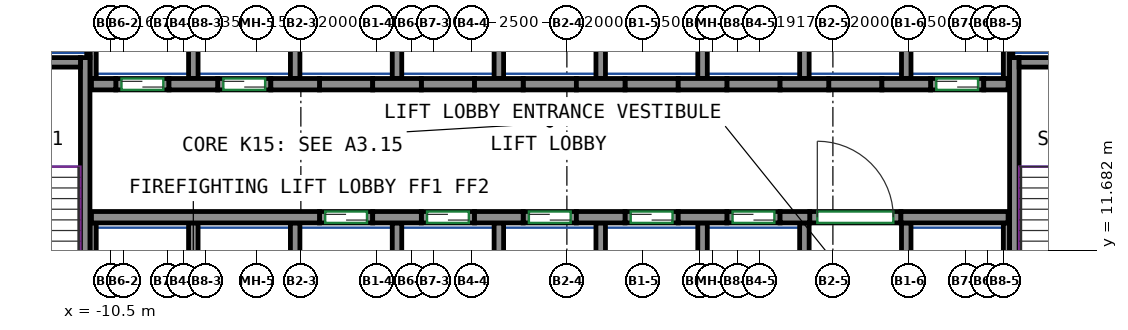
"""IFC4 building model, lengths in metres.
Left out: names, types, materials, properties, quantities, classifications, styles, units other than length and angle.
Written with IfcOpenShell. Run it as: python <this file> out.ifc"""

import sys

from ifc_helpers import new_model, si_unit, direction, frame, frame_2d, origin, place, context, subcontext, project, spatial, rectangle, extrude, source, transform, mapped, element, fill, save


model = new_model("IFC4")
c1 = context("Model", 3, precision=1e-05, world=origin(), true_north=direction((0.0, 1.0)))
c2 = subcontext(c1, "Body", "Model", "MODEL_VIEW")
j1 = project(units=[si_unit("LENGTHUNIT", "METRE"), si_unit("PLANEANGLEUNIT", "RADIAN")], contexts=[c1])
p1 = place(None, origin())
s1 = spatial("IfcSite", under=j1, at=p1, CompositionType="ELEMENT")
p2 = place(p1, origin())
s2 = spatial("IfcBuilding", under=s1, at=p2, CompositionType="ELEMENT")
p3 = place(p2, frame((0.0, 0.0, 63.2)))
s3 = spatial("IfcBuildingStorey", under=s2, at=p3, CompositionType="ELEMENT", Elevation=63.2)
m1 = source(origin(), c2, "Body", "SweptSolid", [
    extrude(rectangle(XDim=7.75, YDim=0.25, at=frame_2d((3.875, 0.0))), origin(), (0.0, 0.0, 1.0), 3.72),
])
p4 = place(p3, frame((-11.175, 9.0, 0.0), z_axis=(0.0, 0.0, 1.0), x_axis=(0.0, 1.0, 0.0)))
e1 = element("IfcWall", 1, at=p4, inside=s3, PredefinedType="SHEAR", context=c2, shape_type="MappedRepresentation", body=[
    mapped(m1, transform((0.0, 0.0, 0.0))),
])
m2 = source(origin(), c2, "Body", "SweptSolid", [
    extrude(rectangle(XDim=3.7, YDim=0.25, at=frame_2d((1.85, 0.0))), origin(), (0.0, 0.0, 1.0), 3.72),
])
p5 = place(p3, frame((-15.0, 16.625, 0.0), z_axis=(0.0, 0.0, 1.0), x_axis=(1.0, 0.0, 0.0)))
e2 = element("IfcWall", 2, at=p5, inside=s3, PredefinedType="SHEAR", context=c2, shape_type="MappedRepresentation", body=[
    mapped(m2, transform((0.0, 0.0, 0.0))),
])
p6 = place(p3, frame((13.275, 9.0, 0.0), z_axis=(0.0, 0.0, 1.0), x_axis=(0.0, 1.0, 0.0)))
e3 = element("IfcWall", 3, at=p6, inside=s3, PredefinedType="SHEAR", context=c2, shape_type="MappedRepresentation", body=[
    mapped(m1, transform((0.0, 0.0, 0.0))),
])
m3 = source(origin(), c2, "Body", "SweptSolid", [
    extrude(rectangle(XDim=3.7, YDim=0.25, at=frame_2d((1.85, 0.0))), origin(), (0.0, 0.0, 1.0), 3.72),
])
p7 = place(p3, frame((13.4, 16.625, 0.0), z_axis=(0.0, 0.0, 1.0), x_axis=(1.0, 0.0, 0.0)))
e4 = element("IfcWall", 4, at=p7, inside=s3, PredefinedType="SHEAR", context=c2, shape_type="MappedRepresentation", body=[
    mapped(m3, transform((0.0, 0.0, 0.0))),
])
m4 = source(origin(), c2, "Body", "SweptSolid", [
    extrude(rectangle(XDim=6.0, YDim=0.3, at=frame_2d((3.0, 0.0))), origin(), (0.0, 0.0, 1.0), 3.72),
])
p8 = place(p3, frame((-11.01, 12.55, 0.0), z_axis=(0.0, 0.0, 1.0), x_axis=(1.0, 0.0, 0.0)))
e5 = element("IfcWall", 5, at=p8, inside=s3, PredefinedType="SHEAR", context=c2, shape_type="MappedRepresentation", body=[
    mapped(m4, transform((0.0, 0.0, 0.0))),
])
m5 = source(origin(), c2, "Body", "SweptSolid", [
    extrude(rectangle(XDim=1.28, YDim=0.3, at=frame_2d((0.64, 0.0))), origin(), (0.0, 0.0, 1.0), 3.72),
])
for number, where, z_axis, x_axis in (
    (6, (-3.61, 12.55, 0.0), (0.0, 0.0, 1.0), (1.0, 0.0, 0.0)),
    (7, (-0.93, 12.55, 0.0), (0.0, 0.0, 1.0), (1.0, 0.0, 0.0)),
    (8, (1.75, 12.55, 0.0), (0.0, 0.0, 1.0), (1.0, 0.0, 0.0)),
    (9, (4.43, 12.55, 0.0), (0.0, 0.0, 1.0), (1.0, 0.0, 0.0)),
):
    element("IfcWall", number, at=place(p3, frame(where, z_axis=z_axis, x_axis=x_axis)), inside=s3, PredefinedType="SHEAR", context=c2, shape_type="MappedRepresentation", body=[
        mapped(m5, transform((0.0, 0.0, 0.0))),
    ])
m6 = source(origin(), c2, "Body", "SweptSolid", [
    extrude(rectangle(XDim=0.78, YDim=0.3, at=frame_2d((0.39, 0.0))), origin(), (0.0, 0.0, 1.0), 3.72),
])
p9 = place(p3, frame((7.11, 12.55, 0.0), z_axis=(0.0, 0.0, 1.0), x_axis=(1.0, 0.0, 0.0)))
e10 = element("IfcWall", 10, at=p9, inside=s3, PredefinedType="SHEAR", context=c2, shape_type="MappedRepresentation", body=[
    mapped(m6, transform((0.0, 0.0, 0.0))),
])
m7 = source(origin(), c2, "Body", "SweptSolid", [
    extrude(rectangle(XDim=2.82, YDim=0.3, at=frame_2d((1.41, 0.0))), origin(), (0.0, 0.0, 1.0), 3.72),
])
p10 = place(p3, frame((10.29, 12.55, 0.0), z_axis=(0.0, 0.0, 1.0), x_axis=(1.0, 0.0, 0.0)))
e11 = element("IfcWall", 11, at=p10, inside=s3, PredefinedType="SHEAR", context=c2, shape_type="MappedRepresentation", body=[
    mapped(m7, transform((0.0, 0.0, 0.0))),
])
m8 = source(origin(), c2, "Body", "SweptSolid", [
    extrude(rectangle(XDim=0.64, YDim=0.3, at=frame_2d((0.32, 0.0))), origin(), (0.0, 0.0, 1.0), 3.72),
])
p11 = place(p3, frame((-11.01, 16.05, 0.0), z_axis=(0.0, 0.0, 1.0), x_axis=(1.0, 0.0, 0.0)))
e12 = element("IfcWall", 12, at=p11, inside=s3, PredefinedType="SHEAR", context=c2, shape_type="MappedRepresentation", body=[
    mapped(m8, transform((0.0, 0.0, 0.0))),
])
for number, where, z_axis, x_axis in (
    (13, (-8.97, 16.05, 0.0), (0.0, 0.0, 1.0), (1.0, 0.0, 0.0)),
    (14, (-6.29, 16.05, 0.0), (0.0, 0.0, 1.0), (1.0, 0.0, 0.0)),
    (15, (-3.61, 16.05, 0.0), (0.0, 0.0, 1.0), (1.0, 0.0, 0.0)),
    (16, (-0.93, 16.05, 0.0), (0.0, 0.0, 1.0), (1.0, 0.0, 0.0)),
    (17, (1.75, 16.05, 0.0), (0.0, 0.0, 1.0), (1.0, 0.0, 0.0)),
    (18, (4.43, 16.05, 0.0), (0.0, 0.0, 1.0), (1.0, 0.0, 0.0)),
):
    element("IfcWall", number, at=place(p3, frame(where, z_axis=z_axis, x_axis=x_axis)), inside=s3, PredefinedType="SHEAR", context=c2, shape_type="MappedRepresentation", body=[
        mapped(m5, transform((0.0, 0.0, 0.0))),
    ])
m9 = source(origin(), c2, "Body", "SweptSolid", [
    extrude(rectangle(XDim=1.28, YDim=0.3, at=frame_2d((0.64, 0.0))), origin(), (0.0, 0.0, 1.0), 3.72),
])
p12 = place(p3, frame((7.11, 16.05, 0.0), z_axis=(0.0, 0.0, 1.0), x_axis=(1.0, 0.0, 0.0)))
e19 = element("IfcWall", 19, at=p12, inside=s3, PredefinedType="SHEAR", context=c2, shape_type="MappedRepresentation", body=[
    mapped(m9, transform((0.0, 0.0, 0.0))),
])
p13 = place(p3, frame((9.79, 16.05, 0.0), z_axis=(0.0, 0.0, 1.0), x_axis=(1.0, 0.0, 0.0)))
e20 = element("IfcWall", 20, at=p13, inside=s3, PredefinedType="SHEAR", context=c2, shape_type="MappedRepresentation", body=[
    mapped(m5, transform((0.0, 0.0, 0.0))),
])
m10 = source(origin(), c2, "Body", "SweptSolid", [
    extrude(rectangle(XDim=0.64, YDim=0.3, at=frame_2d((0.32, 0.0))), origin(), (0.0, 0.0, 1.0), 3.72),
])
p14 = place(p3, frame((12.47, 16.05, 0.0), z_axis=(0.0, 0.0, 1.0), x_axis=(1.0, 0.0, 0.0)))
e21 = element("IfcWall", 21, at=p14, inside=s3, PredefinedType="SHEAR", context=c2, shape_type="MappedRepresentation", body=[
    mapped(m10, transform((0.0, 0.0, 0.0))),
])
m11 = source(origin(), c2, "Body", "SweptSolid", [
    extrude(rectangle(XDim=1.4, YDim=0.3, at=frame_2d((0.7, 0.0))), origin(), (0.0, 0.0, 1.0), 3.72),
])
p15 = place(p3, frame((-5.01, 12.55, 0.0), z_axis=(0.0, 0.0, 1.0), x_axis=(1.0, 0.0, 0.0)))
e22 = element("IfcWall", 22, at=p15, inside=s3, PredefinedType="PARTITIONING", context=c2, shape_type="MappedRepresentation", body=[
    mapped(m11, transform((0.0, 0.0, 0.0))),
])
p16 = place(p15, frame((0.15, 0.0, 0.0)))
e23 = element("IfcOpeningElement", 23, at=p16, cuts=e22, PredefinedType="OPENING", context=c2, shape_type="SweptSolid", body=[
    extrude(rectangle(XDim=1.1, YDim=2.1, at=frame_2d((0.55, 1.05))), frame((0.0, 0.16, 0.0), z_axis=(0.0, -1.0, 0.0), x_axis=(1.0, 0.0, 0.0)), (0.0, 0.0, 1.0), 0.32),
])
m12 = source(origin(), c2, "Body", "SweptSolid", [
    extrude(rectangle(XDim=1.4, YDim=0.3, at=frame_2d((0.7, 0.0))), origin(), (0.0, 0.0, 1.0), 3.72),
])
p17 = place(p3, frame((-2.33, 12.55, 0.0), z_axis=(0.0, 0.0, 1.0), x_axis=(1.0, 0.0, 0.0)))
e24 = element("IfcWall", 24, at=p17, inside=s3, PredefinedType="PARTITIONING", context=c2, shape_type="MappedRepresentation", body=[
    mapped(m12, transform((0.0, 0.0, 0.0))),
])
p18 = place(p17, frame((0.15, 0.0, 0.0)))
e25 = element("IfcOpeningElement", 25, at=p18, cuts=e24, PredefinedType="OPENING", context=c2, shape_type="SweptSolid", body=[
    extrude(rectangle(XDim=1.1, YDim=2.1, at=frame_2d((0.55, 1.05))), frame((0.0, 0.16, 0.0), z_axis=(0.0, -1.0, 0.0), x_axis=(1.0, 0.0, 0.0)), (0.0, 0.0, 1.0), 0.32),
])
p19 = place(p3, frame((0.35, 12.55, 0.0), z_axis=(0.0, 0.0, 1.0), x_axis=(1.0, 0.0, 0.0)))
e26 = element("IfcWall", 26, at=p19, inside=s3, PredefinedType="PARTITIONING", context=c2, shape_type="MappedRepresentation", body=[
    mapped(m11, transform((0.0, 0.0, 0.0))),
])
p20 = place(p19, frame((0.15, 0.0, 0.0)))
e27 = element("IfcOpeningElement", 27, at=p20, cuts=e26, PredefinedType="OPENING", context=c2, shape_type="SweptSolid", body=[
    extrude(rectangle(XDim=1.1, YDim=2.1, at=frame_2d((0.55, 1.05))), frame((0.0, 0.16, 0.0), z_axis=(0.0, -1.0, 0.0), x_axis=(1.0, 0.0, 0.0)), (0.0, 0.0, 1.0), 0.32),
])
p21 = place(p3, frame((3.03, 12.55, 0.0), z_axis=(0.0, 0.0, 1.0), x_axis=(1.0, 0.0, 0.0)))
e28 = element("IfcWall", 28, at=p21, inside=s3, PredefinedType="PARTITIONING", context=c2, shape_type="MappedRepresentation", body=[
    mapped(m11, transform((0.0, 0.0, 0.0))),
])
p22 = place(p21, frame((0.15, 0.0, 0.0)))
e29 = element("IfcOpeningElement", 29, at=p22, cuts=e28, PredefinedType="OPENING", context=c2, shape_type="SweptSolid", body=[
    extrude(rectangle(XDim=1.1, YDim=2.1, at=frame_2d((0.55, 1.05))), frame((0.0, 0.16, 0.0), z_axis=(0.0, -1.0, 0.0), x_axis=(1.0, 0.0, 0.0)), (0.0, 0.0, 1.0), 0.32),
])
p23 = place(p3, frame((5.71, 12.55, 0.0), z_axis=(0.0, 0.0, 1.0), x_axis=(1.0, 0.0, 0.0)))
e30 = element("IfcWall", 30, at=p23, inside=s3, PredefinedType="PARTITIONING", context=c2, shape_type="MappedRepresentation", body=[
    mapped(m12, transform((0.0, 0.0, 0.0))),
])
p24 = place(p23, frame((0.15, 0.0, 0.0)))
e31 = element("IfcOpeningElement", 31, at=p24, cuts=e30, PredefinedType="OPENING", context=c2, shape_type="SweptSolid", body=[
    extrude(rectangle(XDim=1.1, YDim=2.1, at=frame_2d((0.55, 1.05))), frame((0.0, 0.16, 0.0), z_axis=(0.0, -1.0, 0.0), x_axis=(1.0, 0.0, 0.0)), (0.0, 0.0, 1.0), 0.32),
])
p25 = place(p3, frame((11.07, 16.05, 0.0), z_axis=(0.0, 0.0, 1.0), x_axis=(1.0, 0.0, 0.0)))
e32 = element("IfcWall", 32, at=p25, inside=s3, PredefinedType="PARTITIONING", context=c2, shape_type="MappedRepresentation", body=[
    mapped(m11, transform((0.0, 0.0, 0.0))),
])
p26 = place(p25, frame((0.15, 0.0, 0.0)))
e33 = element("IfcOpeningElement", 33, at=p26, cuts=e32, PredefinedType="OPENING", context=c2, shape_type="SweptSolid", body=[
    extrude(rectangle(XDim=1.1, YDim=2.1, at=frame_2d((0.55, 1.05))), frame((0.0, 0.16, 0.0), z_axis=(0.0, -1.0, 0.0), x_axis=(1.0, 0.0, 0.0)), (0.0, 0.0, 1.0), 0.32),
])
p27 = place(p3, frame((-10.37, 16.05, 0.0), z_axis=(0.0, 0.0, 1.0), x_axis=(1.0, 0.0, 0.0)))
e34 = element("IfcWall", 34, at=p27, inside=s3, PredefinedType="PARTITIONING", context=c2, shape_type="MappedRepresentation", body=[
    mapped(m12, transform((0.0, 0.0, 0.0))),
])
p28 = place(p27, frame((0.15, 0.0, 0.0)))
e35 = element("IfcOpeningElement", 35, at=p28, cuts=e34, PredefinedType="OPENING", context=c2, shape_type="SweptSolid", body=[
    extrude(rectangle(XDim=1.1, YDim=2.1, at=frame_2d((0.55, 1.05))), frame((0.0, 0.16, 0.0), z_axis=(0.0, -1.0, 0.0), x_axis=(1.0, 0.0, 0.0)), (0.0, 0.0, 1.0), 0.32),
])
p29 = place(p3, frame((-7.69, 16.05, 0.0), z_axis=(0.0, 0.0, 1.0), x_axis=(1.0, 0.0, 0.0)))
e36 = element("IfcWall", 36, at=p29, inside=s3, PredefinedType="PARTITIONING", context=c2, shape_type="MappedRepresentation", body=[
    mapped(m11, transform((0.0, 0.0, 0.0))),
])
p30 = place(p29, frame((0.15, 0.0, 0.0)))
e37 = element("IfcOpeningElement", 37, at=p30, cuts=e36, PredefinedType="OPENING", context=c2, shape_type="SweptSolid", body=[
    extrude(rectangle(XDim=1.1, YDim=2.1, at=frame_2d((0.55, 1.05))), frame((0.0, 0.16, 0.0), z_axis=(0.0, -1.0, 0.0), x_axis=(1.0, 0.0, 0.0)), (0.0, 0.0, 1.0), 0.32),
])
m13 = source(origin(), c2, "Body", "SweptSolid", [
    extrude(rectangle(XDim=2.4, YDim=0.3, at=frame_2d((1.2, 0.0))), origin(), (0.0, 0.0, 1.0), 3.72),
])
p31 = place(p3, frame((7.89, 12.55, 0.0), z_axis=(0.0, 0.0, 1.0), x_axis=(1.0, 0.0, 0.0)))
e38 = element("IfcWall", 38, at=p31, inside=s3, PredefinedType="PARTITIONING", context=c2, shape_type="MappedRepresentation", body=[
    mapped(m13, transform((0.0, 0.0, 0.0))),
])
p32 = place(p31, frame((0.2, 0.0, 0.0)))
e39 = element("IfcOpeningElement", 39, at=p32, cuts=e38, PredefinedType="OPENING", context=c2, shape_type="SweptSolid", body=[
    extrude(rectangle(XDim=2.0, YDim=2.1, at=frame_2d((1.0, 1.05))), frame((0.0, 0.16, 0.0), z_axis=(0.0, -1.0, 0.0), x_axis=(1.0, 0.0, 0.0)), (0.0, 0.0, 1.0), 0.32),
])
p33 = place(p3, frame((-5.01, 16.05, 0.0), z_axis=(0.0, 0.0, 1.0), x_axis=(1.0, 0.0, 0.0)))
e40 = element("IfcWall", 40, at=p33, inside=s3, PredefinedType="PARTITIONING", context=c2, shape_type="MappedRepresentation", body=[
    mapped(m11, transform((0.0, 0.0, 0.0))),
])
p34 = place(p3, frame((-2.33, 16.05, 0.0), z_axis=(0.0, 0.0, 1.0), x_axis=(1.0, 0.0, 0.0)))
e41 = element("IfcWall", 41, at=p34, inside=s3, PredefinedType="PARTITIONING", context=c2, shape_type="MappedRepresentation", body=[
    mapped(m12, transform((0.0, 0.0, 0.0))),
])
for number, where, z_axis, x_axis in (
    (42, (0.35, 16.05, 0.0), (0.0, 0.0, 1.0), (1.0, 0.0, 0.0)),
    (43, (3.03, 16.05, 0.0), (0.0, 0.0, 1.0), (1.0, 0.0, 0.0)),
):
    element("IfcWall", number, at=place(p3, frame(where, z_axis=z_axis, x_axis=x_axis)), inside=s3, PredefinedType="PARTITIONING", context=c2, shape_type="MappedRepresentation", body=[
        mapped(m11, transform((0.0, 0.0, 0.0))),
    ])
for number, where, z_axis, x_axis in (
    (44, (5.71, 16.05, 0.0), (0.0, 0.0, 1.0), (1.0, 0.0, 0.0)),
    (45, (8.39, 16.05, 0.0), (0.0, 0.0, 1.0), (1.0, 0.0, 0.0)),
):
    element("IfcWall", number, at=place(p3, frame(where, z_axis=z_axis, x_axis=x_axis)), inside=s3, PredefinedType="PARTITIONING", context=c2, shape_type="MappedRepresentation", body=[
        mapped(m12, transform((0.0, 0.0, 0.0))),
    ])
m14 = source(origin(), c2, "Body", "SweptSolid", [
    extrude(rectangle(XDim=3.275, YDim=0.165, at=frame_2d((1.638, 0.0))), origin(), (0.0, 0.0, 1.0), 3.72),
])
for number, where, z_axis, x_axis in (
    (46, (13.067, 16.2, 0.0), (0.0, 0.0, 1.0), (0.0, 1.0, 0.0)),
    (47, (-10.968, 16.2, 0.0), (0.0, 0.0, 1.0), (0.0, 1.0, 0.0)),
):
    element("IfcWall", number, at=place(p3, frame(where, z_axis=z_axis, x_axis=x_axis)), inside=s3, PredefinedType="PARTITIONING", context=c2, shape_type="MappedRepresentation", body=[
        mapped(m14, transform((0.0, 0.0, 0.0))),
    ])
m15 = source(origin(), c2, "Body", "SweptSolid", [
    extrude(rectangle(XDim=3.275, YDim=0.25, at=frame_2d((1.638, 0.0))), origin(), (0.0, 0.0, 1.0), 3.72),
])
p35 = place(p3, frame((10.43, 16.2, 0.0), z_axis=(0.0, 0.0, 1.0), x_axis=(0.0, 1.0, 0.0)))
e48 = element("IfcWall", 48, at=p35, inside=s3, PredefinedType="PARTITIONING", context=c2, shape_type="MappedRepresentation", body=[
    mapped(m15, transform((0.0, 0.0, 0.0))),
])
m16 = source(origin(), c2, "Body", "SweptSolid", [
    extrude(rectangle(XDim=2.725, YDim=0.085, at=frame_2d((1.363, 0.0))), origin(), (0.0, 0.0, 1.0), 3.72),
])
p36 = place(p3, frame((13.192, 16.75, 0.0), z_axis=(0.0, 0.0, 1.0), x_axis=(0.0, 1.0, 0.0)))
e49 = element("IfcWall", 49, at=p36, inside=s3, PredefinedType="PARTITIONING", context=c2, shape_type="MappedRepresentation", body=[
    mapped(m16, transform((0.0, 0.0, 0.0))),
])
for number, where, z_axis, x_axis in (
    (50, (2.39, 16.2, 0.0), (0.0, 0.0, 1.0), (0.0, 1.0, 0.0)),
    (51, (5.07, 16.2, 0.0), (0.0, 0.0, 1.0), (0.0, 1.0, 0.0)),
    (52, (7.75, 16.2, 0.0), (0.0, 0.0, 1.0), (0.0, 1.0, 0.0)),
    (53, (-0.29, 16.2, 0.0), (0.0, 0.0, 1.0), (0.0, 1.0, 0.0)),
):
    element("IfcWall", number, at=place(p3, frame(where, z_axis=z_axis, x_axis=x_axis)), inside=s3, PredefinedType="PARTITIONING", context=c2, shape_type="MappedRepresentation", body=[
        mapped(m15, transform((0.0, 0.0, 0.0))),
    ])
p37 = place(p3, frame((-11.093, 16.75, 0.0), z_axis=(0.0, 0.0, 1.0), x_axis=(0.0, 1.0, 0.0)))
e54 = element("IfcWall", 54, at=p37, inside=s3, PredefinedType="PARTITIONING", context=c2, shape_type="MappedRepresentation", body=[
    mapped(m16, transform((0.0, 0.0, 0.0))),
])
for number, where, z_axis, x_axis in (
    (55, (-2.97, 16.2, 0.0), (0.0, 0.0, 1.0), (0.0, 1.0, 0.0)),
    (56, (-5.65, 16.2, 0.0), (0.0, 0.0, 1.0), (0.0, 1.0, 0.0)),
    (57, (-8.33, 16.2, 0.0), (0.0, 0.0, 1.0), (0.0, 1.0, 0.0)),
):
    element("IfcWall", number, at=place(p3, frame(where, z_axis=z_axis, x_axis=x_axis)), inside=s3, PredefinedType="PARTITIONING", context=c2, shape_type="MappedRepresentation", body=[
        mapped(m15, transform((0.0, 0.0, 0.0))),
    ])
m17 = source(origin(), c2, "Body", "SweptSolid", [
    extrude(rectangle(XDim=3.4, YDim=0.25, at=frame_2d((1.7, 0.0))), origin(), (0.0, 0.0, 1.0), 3.72),
])
p38 = place(p3, frame((10.43, 9.0, 0.0), z_axis=(0.0, 0.0, 1.0), x_axis=(0.0, 1.0, 0.0)))
e58 = element("IfcWall", 58, at=p38, inside=s3, PredefinedType="PARTITIONING", context=c2, shape_type="MappedRepresentation", body=[
    mapped(m17, transform((0.0, 0.0, 0.0))),
])
m18 = source(origin(), c2, "Body", "SweptSolid", [
    extrude(rectangle(XDim=3.4, YDim=0.165, at=frame_2d((1.7, 0.0))), origin(), (0.0, 0.0, 1.0), 3.72),
])
p39 = place(p3, frame((13.067, 9.0, 0.0), z_axis=(0.0, 0.0, 1.0), x_axis=(0.0, 1.0, 0.0)))
e59 = element("IfcWall", 59, at=p39, inside=s3, PredefinedType="PARTITIONING", context=c2, shape_type="MappedRepresentation", body=[
    mapped(m18, transform((0.0, 0.0, 0.0))),
])
for number, where, z_axis, x_axis in (
    (60, (2.39, 9.0, 0.0), (0.0, 0.0, 1.0), (0.0, 1.0, 0.0)),
    (61, (5.07, 9.0, 0.0), (0.0, 0.0, 1.0), (0.0, 1.0, 0.0)),
    (62, (7.75, 9.0, 0.0), (0.0, 0.0, 1.0), (0.0, 1.0, 0.0)),
    (63, (-0.29, 9.0, 0.0), (0.0, 0.0, 1.0), (0.0, 1.0, 0.0)),
):
    element("IfcWall", number, at=place(p3, frame(where, z_axis=z_axis, x_axis=x_axis)), inside=s3, PredefinedType="PARTITIONING", context=c2, shape_type="MappedRepresentation", body=[
        mapped(m17, transform((0.0, 0.0, 0.0))),
    ])
p40 = place(p3, frame((-10.968, 9.0, 0.0), z_axis=(0.0, 0.0, 1.0), x_axis=(0.0, 1.0, 0.0)))
e64 = element("IfcWall", 64, at=p40, inside=s3, PredefinedType="PARTITIONING", context=c2, shape_type="MappedRepresentation", body=[
    mapped(m18, transform((0.0, 0.0, 0.0))),
])
for number, where, z_axis, x_axis in (
    (65, (-2.97, 9.0, 0.0), (0.0, 0.0, 1.0), (0.0, 1.0, 0.0)),
    (66, (-5.65, 9.0, 0.0), (0.0, 0.0, 1.0), (0.0, 1.0, 0.0)),
    (67, (-8.33, 9.0, 0.0), (0.0, 0.0, 1.0), (0.0, 1.0, 0.0)),
):
    element("IfcWall", number, at=place(p3, frame(where, z_axis=z_axis, x_axis=x_axis)), inside=s3, PredefinedType="PARTITIONING", context=c2, shape_type="MappedRepresentation", body=[
        mapped(m17, transform((0.0, 0.0, 0.0))),
    ])
p41 = place(p32, origin())
e68 = element("IfcDoor", 68, at=p41, inside=s3, OperationType="DOUBLE_DOOR_SINGLE_SWING", PredefinedType="DOOR", context=c2, shape_type="SweptSolid", body=[
    extrude(rectangle(XDim=2.0, YDim=2.1, at=frame_2d((1.0, 1.05))), frame((0.0, 0.025, 0.0), z_axis=(0.0, -1.0, 0.0), x_axis=(1.0, 0.0, 0.0)), (0.0, 0.0, 1.0), 0.05),
])
fill(e39, e68)
p42 = place(p16, origin())
e69 = element("IfcDoor", 69, at=p42, inside=s3, OperationType="DOUBLE_DOOR_SLIDING", PredefinedType="DOOR", context=c2, shape_type="SweptSolid", body=[
    extrude(rectangle(XDim=1.1, YDim=2.1, at=frame_2d((0.55, 1.05))), frame((0.0, 0.025, 0.0), z_axis=(0.0, -1.0, 0.0), x_axis=(1.0, 0.0, 0.0)), (0.0, 0.0, 1.0), 0.05),
])
fill(e23, e69)
p43 = place(p18, origin())
e70 = element("IfcDoor", 70, at=p43, inside=s3, OperationType="DOUBLE_DOOR_SLIDING", PredefinedType="DOOR", context=c2, shape_type="SweptSolid", body=[
    extrude(rectangle(XDim=1.1, YDim=2.1, at=frame_2d((0.55, 1.05))), frame((0.0, 0.025, 0.0), z_axis=(0.0, -1.0, 0.0), x_axis=(1.0, 0.0, 0.0)), (0.0, 0.0, 1.0), 0.05),
])
fill(e25, e70)
p44 = place(p20, origin())
e71 = element("IfcDoor", 71, at=p44, inside=s3, OperationType="DOUBLE_DOOR_SLIDING", PredefinedType="DOOR", context=c2, shape_type="SweptSolid", body=[
    extrude(rectangle(XDim=1.1, YDim=2.1, at=frame_2d((0.55, 1.05))), frame((0.0, 0.025, 0.0), z_axis=(0.0, -1.0, 0.0), x_axis=(1.0, 0.0, 0.0)), (0.0, 0.0, 1.0), 0.05),
])
fill(e27, e71)
p45 = place(p22, origin())
e72 = element("IfcDoor", 72, at=p45, inside=s3, OperationType="DOUBLE_DOOR_SLIDING", PredefinedType="DOOR", context=c2, shape_type="SweptSolid", body=[
    extrude(rectangle(XDim=1.1, YDim=2.1, at=frame_2d((0.55, 1.05))), frame((0.0, 0.025, 0.0), z_axis=(0.0, -1.0, 0.0), x_axis=(1.0, 0.0, 0.0)), (0.0, 0.0, 1.0), 0.05),
])
fill(e29, e72)
p46 = place(p24, origin())
e73 = element("IfcDoor", 73, at=p46, inside=s3, OperationType="DOUBLE_DOOR_SLIDING", PredefinedType="DOOR", context=c2, shape_type="SweptSolid", body=[
    extrude(rectangle(XDim=1.1, YDim=2.1, at=frame_2d((0.55, 1.05))), frame((0.0, 0.025, 0.0), z_axis=(0.0, -1.0, 0.0), x_axis=(1.0, 0.0, 0.0)), (0.0, 0.0, 1.0), 0.05),
])
fill(e31, e73)
p47 = place(p26, origin())
e74 = element("IfcDoor", 74, at=p47, inside=s3, OperationType="DOUBLE_DOOR_SLIDING", PredefinedType="DOOR", context=c2, shape_type="SweptSolid", body=[
    extrude(rectangle(XDim=1.1, YDim=2.1, at=frame_2d((0.55, 1.05))), frame((0.0, 0.025, 0.0), z_axis=(0.0, -1.0, 0.0), x_axis=(1.0, 0.0, 0.0)), (0.0, 0.0, 1.0), 0.05),
])
fill(e33, e74)
p48 = place(p28, origin())
e75 = element("IfcDoor", 75, at=p48, inside=s3, OperationType="DOUBLE_DOOR_SLIDING", PredefinedType="DOOR", context=c2, shape_type="SweptSolid", body=[
    extrude(rectangle(XDim=1.1, YDim=2.1, at=frame_2d((0.55, 1.05))), frame((0.0, 0.025, 0.0), z_axis=(0.0, -1.0, 0.0), x_axis=(1.0, 0.0, 0.0)), (0.0, 0.0, 1.0), 0.05),
])
fill(e35, e75)
p49 = place(p30, origin())
e76 = element("IfcDoor", 76, at=p49, inside=s3, OperationType="DOUBLE_DOOR_SLIDING", PredefinedType="DOOR", context=c2, shape_type="SweptSolid", body=[
    extrude(rectangle(XDim=1.1, YDim=2.1, at=frame_2d((0.55, 1.05))), frame((0.0, 0.025, 0.0), z_axis=(0.0, -1.0, 0.0), x_axis=(1.0, 0.0, 0.0)), (0.0, 0.0, 1.0), 0.05),
])
fill(e37, e76)
save(model, sys.argv[1])
